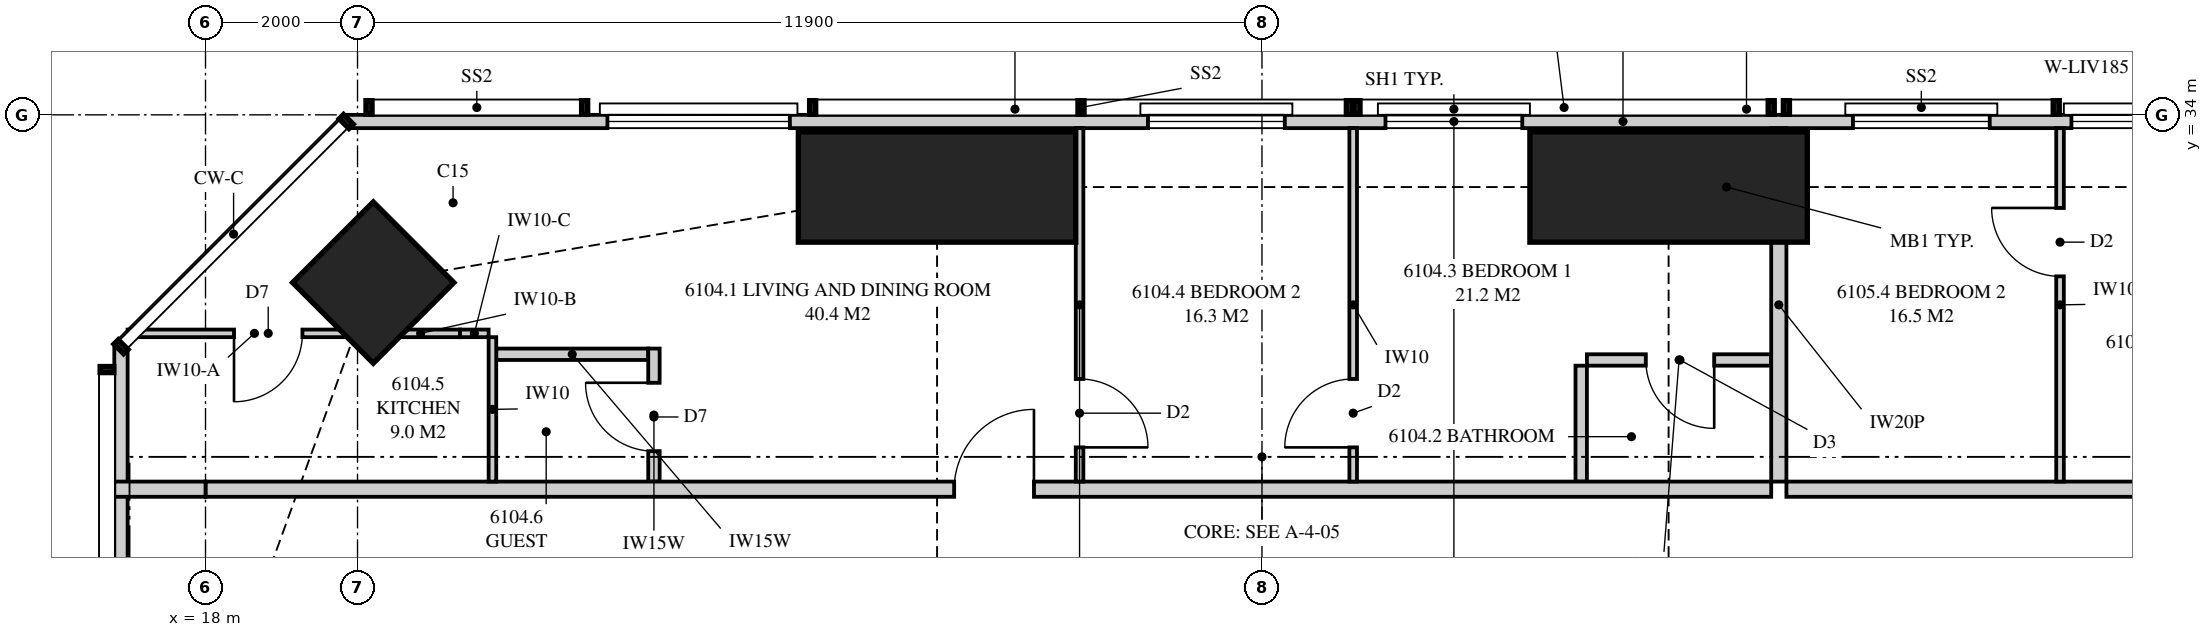
"""IFC4 building model, lengths in metres.
Left out: names, types, materials, properties, quantities, classifications, styles, units other than length and angle.
Written with IfcOpenShell. Run it as: python <this file> out.ifc"""

import sys

from ifc_helpers import new_model, si_unit, direction, frame, frame_2d, origin, origin_2d, place, context, subcontext, project, spatial, polyline, rectangle, outline, extrude, element, fill, save


model = new_model("IFC4")
c1 = context("Model", 3, precision=1e-05, world=origin(), true_north=direction((0.0, 1.0)))
c2 = subcontext(c1, "Body", "Model", "MODEL_VIEW")
j1 = project(units=[si_unit("LENGTHUNIT", "METRE"), si_unit("PLANEANGLEUNIT", "RADIAN")], contexts=[c1])
p1 = place(None, origin())
s1 = spatial("IfcSite", under=j1, at=p1, CompositionType="ELEMENT")
p2 = place(p1, origin())
s2 = spatial("IfcBuilding", under=s1, at=p2, CompositionType="ELEMENT")
p3 = place(p2, frame((0.0, 0.0, 224.95)))
s3 = spatial("IfcBuildingStorey", under=s2, at=p3, CompositionType="ELEMENT", Elevation=224.95)
for number, where, z_axis, x_axis in (
    (1, (37.25, 33.05, 0.0), (0.0, 0.0, 1.0), (0.0, 1.0, 0.0)),
    (2, (27.625, 33.05, 0.0), (0.0, 0.0, 1.0), (0.0, 1.0, 0.0)),
):
    element("IfcColumn", number, at=place(p3, frame(where, z_axis=z_axis, x_axis=x_axis)), inside=s3, PredefinedType="COLUMN", context=c2, shape_type="SweptSolid", body=[
        extrude(rectangle(XDim=1.45, YDim=3.65, at=origin_2d()), origin(), (0.0, 0.0, 1.0), 3.5),
    ])
p4 = place(p3, frame((20.207, 31.793, 0.0), z_axis=(0.0, 0.0, 1.0), x_axis=(0.707106781187, 0.707106781187, 0.0)))
e3 = element("IfcColumn", 3, at=p4, inside=s3, PredefinedType="COLUMN", context=c2, shape_type="SweptSolid", body=[
    extrude(rectangle(XDim=1.5, YDim=1.5, at=origin_2d()), origin(), (0.0, 0.0, 1.0), 3.5),
])
p5 = place(p3, frame((53.449, 33.913, 0.0), z_axis=(0.0, 0.0, 1.0), x_axis=(-1.0, 0.0, 0.0)))
e4 = element("IfcWall", 4, at=p5, inside=s3, PredefinedType="SOLIDWALL", context=c2, shape_type="SweptSolid", body=[
    extrude(outline(polyline([(0.0, 0.0), (33.597, 0.0), (33.597, 3.26), (26.039, 3.26), (26.039, 2.3), (25.955, 2.3), (25.955, 3.26), (25.824, 3.26), (25.824, 2.3), (6.574, 2.3), (6.574, 3.26), (6.442, 3.26), (6.442, 2.3), (6.359, 2.3), (6.359, 3.26), (0.0, 3.26), (0.0, 0.0)])), frame((0.0, 0.087, 0.0), z_axis=(0.0, -1.0, 0.0), x_axis=(1.0, 0.0, 0.0)), (0.0, 0.0, 1.0), 0.175),
])
p6 = place(p5, frame((0.6, 0.0, 0.0)))
e5 = element("IfcOpeningElement", 5, at=p6, cuts=e4, PredefinedType="OPENING", context=c2, shape_type="SweptSolid", body=[
    extrude(rectangle(XDim=1.8, YDim=2.25, at=frame_2d((0.9, 1.125))), frame((0.0, 0.097, 0.0), z_axis=(0.0, -1.0, 0.0), x_axis=(1.0, 0.0, 0.0)), (0.0, 0.0, 1.0), 0.195),
])
p7 = place(p5, frame((8.499, 0.0, 0.4)))
e6 = element("IfcOpeningElement", 6, at=p7, cuts=e4, PredefinedType="OPENING", context=c2, shape_type="SweptSolid", body=[
    extrude(rectangle(XDim=2.4, YDim=1.85, at=frame_2d((1.2, 0.925))), frame((0.0, 0.097, 0.0), z_axis=(0.0, -1.0, 0.0), x_axis=(1.0, 0.0, 0.0)), (0.0, 0.0, 1.0), 0.195),
])
p8 = place(p5, frame((11.974, 0.0, 0.4)))
e7 = element("IfcOpeningElement", 7, at=p8, cuts=e4, PredefinedType="OPENING", context=c2, shape_type="SweptSolid", body=[
    extrude(rectangle(XDim=1.8, YDim=1.85, at=frame_2d((0.9, 0.925))), frame((0.0, 0.097, 0.0), z_axis=(0.0, -1.0, 0.0), x_axis=(1.0, 0.0, 0.0)), (0.0, 0.0, 1.0), 0.195),
])
p9 = place(p5, frame((18.124, 0.0, 0.4)))
e8 = element("IfcOpeningElement", 8, at=p9, cuts=e4, PredefinedType="OPENING", context=c2, shape_type="SweptSolid", body=[
    extrude(rectangle(XDim=1.8, YDim=1.85, at=frame_2d((0.9, 0.925))), frame((0.0, 0.097, 0.0), z_axis=(0.0, -1.0, 0.0), x_axis=(1.0, 0.0, 0.0)), (0.0, 0.0, 1.0), 0.195),
])
p10 = place(p5, frame((21.249, 0.0, 0.4)))
e9 = element("IfcOpeningElement", 9, at=p10, cuts=e4, PredefinedType="OPENING", context=c2, shape_type="SweptSolid", body=[
    extrude(rectangle(XDim=1.8, YDim=1.85, at=frame_2d((0.9, 0.925))), frame((0.0, 0.097, 0.0), z_axis=(0.0, -1.0, 0.0), x_axis=(1.0, 0.0, 0.0)), (0.0, 0.0, 1.0), 0.195),
])
p11 = place(p5, frame((27.76, 0.0, 0.4)))
e10 = element("IfcOpeningElement", 10, at=p11, cuts=e4, PredefinedType="OPENING", context=c2, shape_type="SweptSolid", body=[
    extrude(rectangle(XDim=2.4, YDim=1.85, at=frame_2d((1.2, 0.925))), frame((0.0, 0.097, 0.0), z_axis=(0.0, -1.0, 0.0), x_axis=(1.0, 0.0, 0.0)), (0.0, 0.0, 1.0), 0.195),
])
p12 = place(p3, frame((16.887, 30.949, 0.0), z_axis=(0.0, 0.0, 1.0), x_axis=(0.0, -1.0, 0.0)))
e11 = element("IfcWall", 11, at=p12, inside=s3, PredefinedType="SOLIDWALL", context=c2, shape_type="SweptSolid", body=[
    extrude(outline(polyline([(0.0, 0.0), (27.897, 0.0), (27.897, 3.26), (18.148, 3.26), (18.148, 2.3), (18.125, 2.3), (18.125, 3.26), (17.949, 3.26), (17.949, 2.3), (5.949, 2.3), (5.949, 3.26), (0.0, 3.26), (0.0, 0.0)])), frame((0.0, 0.087, 0.0), z_axis=(0.0, -1.0, 0.0), x_axis=(1.0, 0.0, 0.0)), (0.0, 0.0, 1.0), 0.175),
])
p13 = place(p12, frame((11.849, 0.0, 0.4)))
e12 = element("IfcOpeningElement", 12, at=p13, cuts=e11, PredefinedType="OPENING", context=c2, shape_type="SweptSolid", body=[
    extrude(rectangle(XDim=1.2, YDim=1.85, at=frame_2d((0.6, 0.925))), frame((0.0, 0.097, 0.0), z_axis=(0.0, -1.0, 0.0), x_axis=(1.0, 0.0, 0.0)), (0.0, 0.0, 1.0), 0.195),
])
p14 = place(p12, frame((23.999, 0.0, 0.4)))
e13 = element("IfcOpeningElement", 13, at=p14, cuts=e11, PredefinedType="OPENING", context=c2, shape_type="SweptSolid", body=[
    extrude(rectangle(XDim=1.2, YDim=1.85, at=frame_2d((0.6, 0.925))), frame((0.0, 0.097, 0.0), z_axis=(0.0, -1.0, 0.0), x_axis=(1.0, 0.0, 0.0)), (0.0, 0.0, 1.0), 0.195),
])
p15 = place(p3, frame((38.7, 33.825, 0.0), z_axis=(0.0, 0.0, 1.0), x_axis=(0.0, -1.0, 0.0)))
e14 = element("IfcWall", 14, at=p15, inside=s3, PredefinedType="PARTITIONING", context=c2, shape_type="SweptSolid", body=[
    extrude(outline(polyline([(0.529, 2.3), (0.0, 2.3), (0.0, 0.0), (0.529, 0.0), (0.529, 0.052), (1.021, 0.052), (1.021, 0.0), (4.65, 0.0), (4.65, 3.26), (1.685, 3.26), (1.685, 2.3), (1.021, 2.3), (1.021, 2.249), (0.529, 2.249), (0.529, 2.3)])), frame((0.0, 0.1, 0.0), z_axis=(0.0, -1.0, 0.0), x_axis=(1.0, 0.0, 0.0)), (0.0, 0.0, 1.0), 0.2),
])
p16 = place(p3, frame((18.0, 29.075, 0.0), z_axis=(0.0, 0.0, 1.0), x_axis=(1.0, 0.0, 0.0)))
e15 = element("IfcWall", 15, at=p16, inside=s3, PredefinedType="PARTITIONING", context=c2, shape_type="SweptSolid", body=[
    extrude(outline(polyline([(0.0, 0.0), (20.6, 0.0), (20.6, 3.26), (20.56, 3.26), (20.56, 2.66), (17.94, 2.66), (17.94, 3.26), (10.935, 3.26), (10.935, 2.66), (8.315, 2.66), (8.315, 3.26), (2.192, 3.26), (2.192, 2.3), (0.256, 2.3), (0.256, 3.26), (0.0, 3.26), (0.0, 0.0)])), frame((0.0, 0.1, 0.0), z_axis=(0.0, -1.0, 0.0), x_axis=(1.0, 0.0, 0.0)), (0.0, 0.0, 1.0), 0.2),
])
p17 = place(p16, frame((9.85, 0.0, 0.0)))
e16 = element("IfcOpeningElement", 16, at=p17, cuts=e15, PredefinedType="OPENING", context=c2, shape_type="SweptSolid", body=[
    extrude(rectangle(XDim=1.05, YDim=2.2, at=frame_2d((0.525, 1.1))), frame((0.0, 0.11, 0.0), z_axis=(0.0, -1.0, 0.0), x_axis=(1.0, 0.0, 0.0)), (0.0, 0.0, 1.0), 0.22),
])
p18 = place(p3, frame((36.175, 30.775, 0.0), z_axis=(0.0, 0.0, 1.0), x_axis=(1.0, 0.0, 0.0)))
e17 = element("IfcWall", 17, at=p18, inside=s3, PredefinedType="PLUMBINGWALL", context=c2, shape_type="SweptSolid", body=[
    extrude(outline(polyline([(0.0, 0.0), (2.425, 0.0), (2.425, 3.26), (2.36, 3.26), (2.36, 2.66), (0.0, 2.66), (0.0, 3.26), (0.0, 0.0)])), frame((0.0, 0.075, 0.0), z_axis=(0.0, -1.0, 0.0), x_axis=(1.0, 0.0, 0.0)), (0.0, 0.0, 1.0), 0.15),
])
p19 = place(p18, frame((0.775, 0.0, 0.0)))
e18 = element("IfcOpeningElement", 18, at=p19, cuts=e17, PredefinedType="OPENING", context=c2, shape_type="SweptSolid", body=[
    extrude(rectangle(XDim=0.9, YDim=2.1, at=frame_2d((0.45, 1.05))), frame((0.0, 0.085, 0.0), z_axis=(0.0, -1.0, 0.0), x_axis=(1.0, 0.0, 0.0)), (0.0, 0.0, 1.0), 0.17),
])
p20 = place(p3, frame((36.1, 30.7, 0.0), z_axis=(0.0, 0.0, 1.0), x_axis=(0.0, -1.0, 0.0)))
e19 = element("IfcWall", 19, at=p20, inside=s3, PredefinedType="PLUMBINGWALL", context=c2, shape_type="SweptSolid", body=[
    extrude(outline(polyline([(0.0, 0.0), (1.525, 0.0), (1.525, 3.26), (1.525, 2.66), (0.0, 2.66), (0.0, 3.26), (0.0, 0.0)])), frame((0.0, 0.075, 0.0), z_axis=(0.0, -1.0, 0.0), x_axis=(1.0, 0.0, 0.0)), (0.0, 0.0, 1.0), 0.15),
])
p21 = place(p3, frame((33.1, 33.825, 0.0), z_axis=(0.0, 0.0, 1.0), x_axis=(0.0, -1.0, 0.0)))
e20 = element("IfcWall", 20, at=p21, inside=s3, PredefinedType="PARTITIONING", context=c2, shape_type="SweptSolid", body=[
    extrude(outline(polyline([(0.0, 0.0), (4.65, 0.0), (4.65, 3.26), (1.635, 3.26), (1.635, 2.3), (0.0, 2.3), (0.0, 3.26), (0.0, 0.0)])), frame((0.0, 0.05, 0.0), z_axis=(0.0, -1.0, 0.0), x_axis=(1.0, 0.0, 0.0)), (0.0, 0.0, 1.0), 0.1),
])
p22 = place(p21, frame((3.3, 0.0, 0.0)))
e21 = element("IfcOpeningElement", 21, at=p22, cuts=e20, PredefinedType="OPENING", context=c2, shape_type="SweptSolid", body=[
    extrude(rectangle(XDim=0.9, YDim=2.1, at=frame_2d((0.45, 1.05))), frame((0.0, 0.06, 0.0), z_axis=(0.0, -1.0, 0.0), x_axis=(1.0, 0.0, 0.0)), (0.0, 0.0, 1.0), 0.12),
])
p23 = place(p3, frame((29.5, 33.825, 0.0), z_axis=(0.0, 0.0, 1.0), x_axis=(0.0, -1.0, 0.0)))
e22 = element("IfcWall", 22, at=p23, inside=s3, PredefinedType="PARTITIONING", context=c2, shape_type="SweptSolid", body=[
    extrude(outline(polyline([(0.0, 0.0), (4.65, 0.0), (4.65, 3.26), (1.635, 3.26), (1.635, 2.3), (0.0, 2.3), (0.0, 3.26), (0.0, 0.0)])), frame((0.0, 0.05, 0.0), z_axis=(0.0, -1.0, 0.0), x_axis=(1.0, 0.0, 0.0)), (0.0, 0.0, 1.0), 0.1),
])
p24 = place(p23, frame((3.3, 0.0, 0.0)))
e23 = element("IfcOpeningElement", 23, at=p24, cuts=e22, PredefinedType="OPENING", context=c2, shape_type="SweptSolid", body=[
    extrude(rectangle(XDim=0.9, YDim=2.1, at=frame_2d((0.45, 1.05))), frame((0.0, 0.06, 0.0), z_axis=(0.0, -1.0, 0.0), x_axis=(1.0, 0.0, 0.0)), (0.0, 0.0, 1.0), 0.12),
])
p25 = place(p3, frame((16.975, 31.125, 0.0), z_axis=(0.0, 0.0, 1.0), x_axis=(1.0, 0.0, 0.0)))
e24 = element("IfcWall", 24, at=p25, inside=s3, PredefinedType="PARTITIONING", context=c2, shape_type="SweptSolid", body=[
    extrude(outline(polyline([(0.0, 0.0), (3.337, 0.0), (3.337, 2.3), (2.076, 2.3), (2.076, 3.26), (0.0, 3.26), (0.0, 0.0)])), frame((0.0, 0.05, 0.0), z_axis=(0.0, -1.0, 0.0), x_axis=(1.0, 0.0, 0.0)), (0.0, 0.0, 1.0), 0.1),
])
p26 = place(p25, frame((1.4, 0.0, 0.0)))
e25 = element("IfcOpeningElement", 25, at=p26, cuts=e24, PredefinedType="OPENING", context=c2, shape_type="SweptSolid", body=[
    extrude(rectangle(XDim=0.9, YDim=2.1, at=frame_2d((0.45, 1.05))), frame((0.0, 0.06, 0.0), z_axis=(0.0, -1.0, 0.0), x_axis=(1.0, 0.0, 0.0)), (0.0, 0.0, 1.0), 0.12),
])
p27 = place(p3, frame((20.312, 31.125, 0.0), z_axis=(0.0, 0.0, 1.0), x_axis=(1.0, 0.0, 0.0)))
e26 = element("IfcWall", 26, at=p27, inside=s3, PredefinedType="PARTITIONING", context=c2, shape_type="SweptSolid", body=[
    extrude(rectangle(XDim=1.037, YDim=0.1, at=frame_2d((0.519, 0.0))), origin(), (0.0, 0.0, 1.0), 2.3),
])
p28 = place(p3, frame((21.349, 31.125, 0.0), z_axis=(0.0, 0.0, 1.0), x_axis=(1.0, 0.0, 0.0)))
e27 = element("IfcWall", 27, at=p28, inside=s3, PredefinedType="PARTITIONING", context=c2, shape_type="SweptSolid", body=[
    extrude(outline(polyline([(0.0, 0.0), (0.376, 0.0), (0.376, 3.26), (0.064, 3.26), (0.064, 2.3), (0.0, 2.3), (0.0, 0.0)])), frame((0.0, 0.05, 0.0), z_axis=(0.0, -1.0, 0.0), x_axis=(1.0, 0.0, 0.0)), (0.0, 0.0, 1.0), 0.1),
])
p29 = place(p3, frame((21.775, 31.075, 0.0), z_axis=(0.0, 0.0, 1.0), x_axis=(0.0, -1.0, 0.0)))
e28 = element("IfcWall", 28, at=p29, inside=s3, PredefinedType="PARTITIONING", context=c2, shape_type="SweptSolid", body=[
    extrude(rectangle(XDim=1.9, YDim=0.1, at=frame_2d((0.95, 0.0))), origin(), (0.0, 0.0, 1.0), 3.26),
])
p30 = place(p3, frame((38.8, 29.075, 0.0), z_axis=(0.0, 0.0, 1.0), x_axis=(1.0, 0.0, 0.0)))
e29 = element("IfcWall", 29, at=p30, inside=s3, PredefinedType="PARTITIONING", context=c2, shape_type="SweptSolid", body=[
    extrude(outline(polyline([(0.0, 0.0), (7.075, 0.0), (7.075, 3.26), (7.075, 2.66), (6.765, 2.66), (6.765, 3.26), (0.0, 3.26), (0.0, 0.0)])), frame((0.0, 0.1, 0.0), z_axis=(0.0, -1.0, 0.0), x_axis=(1.0, 0.0, 0.0)), (0.0, 0.0, 1.0), 0.2),
])
p31 = place(p30, frame((5.875, 0.0, 0.0)))
e30 = element("IfcOpeningElement", 30, at=p31, cuts=e29, PredefinedType="OPENING", context=c2, shape_type="SweptSolid", body=[
    extrude(rectangle(XDim=1.05, YDim=2.2, at=frame_2d((0.525, 1.1))), frame((0.0, 0.11, 0.0), z_axis=(0.0, -1.0, 0.0), x_axis=(1.0, 0.0, 0.0)), (0.0, 0.0, 1.0), 0.22),
])
p32 = place(p3, frame((42.4, 33.825, 0.0), z_axis=(0.0, 0.0, 1.0), x_axis=(0.0, -1.0, 0.0)))
e31 = element("IfcWall", 31, at=p32, inside=s3, PredefinedType="PARTITIONING", context=c2, shape_type="SweptSolid", body=[
    extrude(outline(polyline([(0.0, 0.0), (4.65, 0.0), (4.65, 3.26), (1.635, 3.26), (1.635, 2.3), (0.0, 2.3), (0.0, 3.26), (0.0, 0.0)])), frame((0.0, 0.05, 0.0), z_axis=(0.0, -1.0, 0.0), x_axis=(1.0, 0.0, 0.0)), (0.0, 0.0, 1.0), 0.1),
])
p33 = place(p32, frame((1.05, 0.0, 0.0)))
e32 = element("IfcOpeningElement", 32, at=p33, cuts=e31, PredefinedType="OPENING", context=c2, shape_type="SweptSolid", body=[
    extrude(rectangle(XDim=0.9, YDim=2.1, at=frame_2d((0.45, 1.05))), frame((0.0, 0.06, 0.0), z_axis=(0.0, -1.0, 0.0), x_axis=(1.0, 0.0, 0.0)), (0.0, 0.0, 1.0), 0.12),
])
p34 = place(p3, frame((16.8, 29.075, 0.0), z_axis=(0.0, 0.0, 1.0), x_axis=(1.0, 0.0, 0.0)))
e33 = element("IfcWall", 33, at=p34, inside=s3, PredefinedType="PARTITIONING", context=c2, shape_type="SweptSolid", body=[
    extrude(rectangle(XDim=1.2, YDim=0.2, at=frame_2d((0.6, 0.0))), origin(), (0.0, 0.0, 1.0), 3.26),
])
p35 = place(p3, frame((23.9, 29.175, 0.0), z_axis=(0.0, 0.0, 1.0), x_axis=(0.0, 1.0, 0.0)))
e34 = element("IfcWall", 34, at=p35, inside=s3, PredefinedType="PLUMBINGWALL", context=c2, shape_type="SweptSolid", body=[
    extrude(rectangle(XDim=1.75, YDim=0.15, at=frame_2d((0.875, 0.0))), origin(), (0.0, 0.0, 1.0), 3.26),
])
p36 = place(p35, frame((0.4, 0.0, 0.0)))
e35 = element("IfcOpeningElement", 35, at=p36, cuts=e34, PredefinedType="OPENING", context=c2, shape_type="SweptSolid", body=[
    extrude(rectangle(XDim=0.9, YDim=2.1, at=frame_2d((0.45, 1.05))), frame((0.0, 0.085, 0.0), z_axis=(0.0, -1.0, 0.0), x_axis=(1.0, 0.0, 0.0)), (0.0, 0.0, 1.0), 0.17),
])
p37 = place(p3, frame((21.825, 30.85, 0.0), z_axis=(0.0, 0.0, 1.0), x_axis=(1.0, 0.0, 0.0)))
e36 = element("IfcWall", 36, at=p37, inside=s3, PredefinedType="PLUMBINGWALL", context=c2, shape_type="SweptSolid", body=[
    extrude(rectangle(XDim=2.0, YDim=0.15, at=frame_2d((1.0, 0.0))), origin(), (0.0, 0.0, 1.0), 3.26),
])
p38 = place(p7, origin())
e37 = element("IfcWindow", 37, at=p38, inside=s3, PartitioningType="SINGLE_PANEL", PredefinedType="WINDOW", context=c2, shape_type="SweptSolid", body=[
    extrude(rectangle(XDim=2.4, YDim=1.85, at=frame_2d((1.2, 0.925))), frame((0.0, 0.03, 0.0), z_axis=(0.0, -1.0, 0.0), x_axis=(1.0, 0.0, 0.0)), (0.0, 0.0, 1.0), 0.06),
])
fill(e6, e37)
p39 = place(p8, origin())
e38 = element("IfcWindow", 38, at=p39, inside=s3, PartitioningType="SINGLE_PANEL", PredefinedType="WINDOW", context=c2, shape_type="SweptSolid", body=[
    extrude(rectangle(XDim=1.8, YDim=1.85, at=frame_2d((0.9, 0.925))), frame((0.0, 0.03, 0.0), z_axis=(0.0, -1.0, 0.0), x_axis=(1.0, 0.0, 0.0)), (0.0, 0.0, 1.0), 0.06),
])
fill(e7, e38)
p40 = place(p9, origin())
e39 = element("IfcWindow", 39, at=p40, inside=s3, PartitioningType="SINGLE_PANEL", PredefinedType="WINDOW", context=c2, shape_type="SweptSolid", body=[
    extrude(rectangle(XDim=1.8, YDim=1.85, at=frame_2d((0.9, 0.925))), frame((0.0, 0.03, 0.0), z_axis=(0.0, -1.0, 0.0), x_axis=(1.0, 0.0, 0.0)), (0.0, 0.0, 1.0), 0.06),
])
fill(e8, e39)
p41 = place(p10, origin())
e40 = element("IfcWindow", 40, at=p41, inside=s3, PartitioningType="SINGLE_PANEL", PredefinedType="WINDOW", context=c2, shape_type="SweptSolid", body=[
    extrude(rectangle(XDim=1.8, YDim=1.85, at=frame_2d((0.9, 0.925))), frame((0.0, 0.03, 0.0), z_axis=(0.0, -1.0, 0.0), x_axis=(1.0, 0.0, 0.0)), (0.0, 0.0, 1.0), 0.06),
])
fill(e9, e40)
p42 = place(p11, origin())
e41 = element("IfcWindow", 41, at=p42, inside=s3, PartitioningType="SINGLE_PANEL", PredefinedType="WINDOW", context=c2, shape_type="SweptSolid", body=[
    extrude(rectangle(XDim=2.4, YDim=1.85, at=frame_2d((1.2, 0.925))), frame((0.0, 0.03, 0.0), z_axis=(0.0, -1.0, 0.0), x_axis=(1.0, 0.0, 0.0)), (0.0, 0.0, 1.0), 0.06),
])
fill(e10, e41)
p43 = place(p17, origin())
e42 = element("IfcDoor", 42, at=p43, inside=s3, OperationType="SINGLE_SWING_RIGHT", PredefinedType="DOOR", context=c2, shape_type="SweptSolid", body=[
    extrude(rectangle(XDim=1.05, YDim=2.2, at=frame_2d((0.525, 1.1))), frame((0.0, 0.025, 0.0), z_axis=(0.0, -1.0, 0.0), x_axis=(1.0, 0.0, 0.0)), (0.0, 0.0, 1.0), 0.05),
])
fill(e16, e42)
p44 = place(p19, frame((0.9, 0.0, 0.0), z_axis=(0.0, 0.0, 1.0), x_axis=(-1.0, 0.0, 0.0)))
e43 = element("IfcDoor", 43, at=p44, inside=s3, OperationType="SINGLE_SWING_LEFT", PredefinedType="DOOR", context=c2, shape_type="SweptSolid", body=[
    extrude(rectangle(XDim=0.9, YDim=2.1, at=frame_2d((0.45, 1.05))), frame((0.0, 0.025, 0.0), z_axis=(0.0, -1.0, 0.0), x_axis=(1.0, 0.0, 0.0)), (0.0, 0.0, 1.0), 0.05),
])
fill(e18, e43)
p45 = place(p22, frame((0.9, 0.0, 0.0), z_axis=(0.0, 0.0, 1.0), x_axis=(-1.0, 0.0, 0.0)))
e44 = element("IfcDoor", 44, at=p45, inside=s3, OperationType="SINGLE_SWING_LEFT", PredefinedType="DOOR", context=c2, shape_type="SweptSolid", body=[
    extrude(rectangle(XDim=0.9, YDim=2.1, at=frame_2d((0.45, 1.05))), frame((0.0, 0.025, 0.0), z_axis=(0.0, -1.0, 0.0), x_axis=(1.0, 0.0, 0.0)), (0.0, 0.0, 1.0), 0.05),
])
fill(e21, e44)
p46 = place(p24, origin())
e45 = element("IfcDoor", 45, at=p46, inside=s3, OperationType="SINGLE_SWING_RIGHT", PredefinedType="DOOR", context=c2, shape_type="SweptSolid", body=[
    extrude(rectangle(XDim=0.9, YDim=2.1, at=frame_2d((0.45, 1.05))), frame((0.0, 0.025, 0.0), z_axis=(0.0, -1.0, 0.0), x_axis=(1.0, 0.0, 0.0)), (0.0, 0.0, 1.0), 0.05),
])
fill(e23, e45)
p47 = place(p26, frame((0.9, 0.0, 0.0), z_axis=(0.0, 0.0, 1.0), x_axis=(-1.0, 0.0, 0.0)))
e46 = element("IfcDoor", 46, at=p47, inside=s3, OperationType="SINGLE_SWING_RIGHT", PredefinedType="DOOR", context=c2, shape_type="SweptSolid", body=[
    extrude(rectangle(XDim=0.9, YDim=2.1, at=frame_2d((0.45, 1.05))), frame((0.0, 0.025, 0.0), z_axis=(0.0, -1.0, 0.0), x_axis=(1.0, 0.0, 0.0)), (0.0, 0.0, 1.0), 0.05),
])
fill(e25, e46)
p48 = place(p33, frame((0.9, 0.0, 0.0), z_axis=(0.0, 0.0, 1.0), x_axis=(-1.0, 0.0, 0.0)))
e47 = element("IfcDoor", 47, at=p48, inside=s3, OperationType="SINGLE_SWING_RIGHT", PredefinedType="DOOR", context=c2, shape_type="SweptSolid", body=[
    extrude(rectangle(XDim=0.9, YDim=2.1, at=frame_2d((0.45, 1.05))), frame((0.0, 0.025, 0.0), z_axis=(0.0, -1.0, 0.0), x_axis=(1.0, 0.0, 0.0)), (0.0, 0.0, 1.0), 0.05),
])
fill(e32, e47)
p49 = place(p36, origin())
e48 = element("IfcDoor", 48, at=p49, inside=s3, OperationType="SINGLE_SWING_RIGHT", PredefinedType="DOOR", context=c2, shape_type="SweptSolid", body=[
    extrude(rectangle(XDim=0.9, YDim=2.1, at=frame_2d((0.45, 1.05))), frame((0.0, 0.025, 0.0), z_axis=(0.0, -1.0, 0.0), x_axis=(1.0, 0.0, 0.0)), (0.0, 0.0, 1.0), 0.05),
])
fill(e35, e48)
save(model, sys.argv[1])
